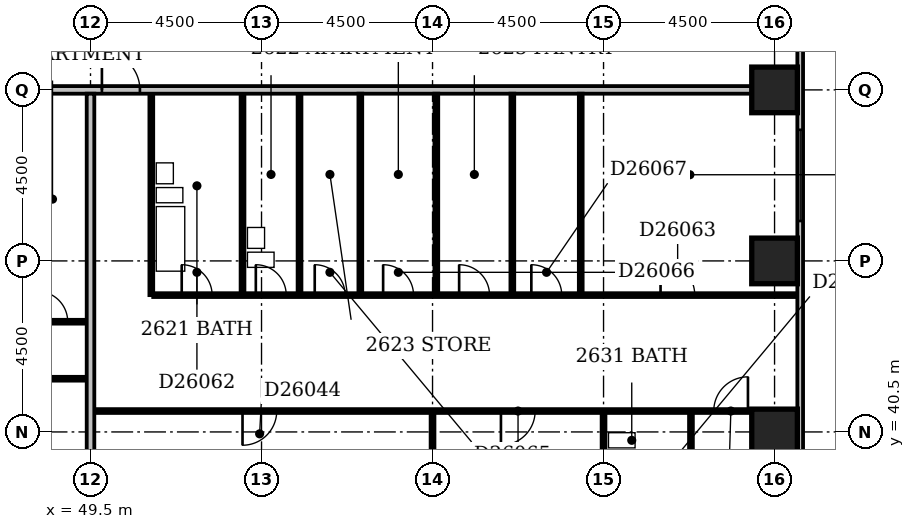
"""IFC4 building model, lengths in metres.
Left out: names, types, materials, properties, quantities, classifications, styles, units other than length and angle.
Written with IfcOpenShell. Run it as: python <this file> out.ifc"""

import sys

from ifc_helpers import new_model, si_unit, direction, frame, frame_2d, origin, origin_2d, place, context, subcontext, project, spatial, rectangle, extrude, element, fill, save


model = new_model("IFC4")
c1 = context("Model", 3, precision=1e-05, world=origin(), true_north=direction((0.0, 1.0)))
c2 = subcontext(c1, "Body", "Model", "MODEL_VIEW")
j1 = project(units=[si_unit("LENGTHUNIT", "METRE"), si_unit("PLANEANGLEUNIT", "RADIAN")], contexts=[c1])
p1 = place(None, origin())
s1 = spatial("IfcSite", under=j1, at=p1, CompositionType="ELEMENT")
p2 = place(p1, origin())
s2 = spatial("IfcBuilding", under=s1, at=p2, CompositionType="ELEMENT")
p3 = place(p2, frame((0.0, 0.0, 104.6)))
s3 = spatial("IfcBuildingStorey", under=s2, at=p3, CompositionType="ELEMENT", Elevation=104.6)
for number, where, z_axis, x_axis in (
    (1, (67.5, 40.5, -0.3), (0.0, 0.0, 1.0), (1.0, 0.0, 0.0)),
    (2, (67.5, 45.0, -0.3), (0.0, 0.0, 1.0), (1.0, 0.0, 0.0)),
    (3, (67.5, 49.5, -0.3), (0.0, 0.0, 1.0), (1.0, 0.0, 0.0)),
):
    element("IfcColumn", number, at=place(p3, frame(where, z_axis=z_axis, x_axis=x_axis)), inside=s3, PredefinedType="COLUMN", context=c2, shape_type="SweptSolid", body=[
        extrude(rectangle(XDim=1.2, YDim=1.2, at=origin_2d()), origin(), (0.0, 0.0, 1.0), 3.45),
    ])
p4 = place(p3, frame((68.175, 35.4, 0.0), z_axis=(0.0, 0.0, 1.0), x_axis=(0.0, 1.0, 0.0)))
e4 = element("IfcWall", 4, at=p4, inside=s3, PredefinedType="STANDARD", context=c2, shape_type="SweptSolid", body=[
    extrude(rectangle(XDim=23.85, YDim=0.15, at=frame_2d((11.925, 0.0))), origin(), (0.0, 0.0, 1.0), 2.5),
])
p5 = place(p4, frame((1.65, 0.0, 0.6)))
e5 = element("IfcOpeningElement", 5, at=p5, cuts=e4, PredefinedType="OPENING", context=c2, shape_type="SweptSolid", body=[
    extrude(rectangle(XDim=2.4, YDim=1.8, at=frame_2d((1.2, 0.9))), frame((0.0, 0.087, 0.0), z_axis=(0.0, -1.0, 0.0), x_axis=(1.0, 0.0, 0.0)), (0.0, 0.0, 1.0), 0.174),
])
p6 = place(p4, frame((10.65, 0.0, 0.6)))
e6 = element("IfcOpeningElement", 6, at=p6, cuts=e4, PredefinedType="OPENING", context=c2, shape_type="SweptSolid", body=[
    extrude(rectangle(XDim=2.4, YDim=1.8, at=frame_2d((1.2, 0.9))), frame((0.0, 0.087, 0.0), z_axis=(0.0, -1.0, 0.0), x_axis=(1.0, 0.0, 0.0)), (0.0, 0.0, 1.0), 0.174),
])
p7 = place(p4, frame((19.65, 0.0, 0.6)))
e7 = element("IfcOpeningElement", 7, at=p7, cuts=e4, PredefinedType="OPENING", context=c2, shape_type="SweptSolid", body=[
    extrude(rectangle(XDim=2.4, YDim=1.8, at=frame_2d((1.2, 0.9))), frame((0.0, 0.087, 0.0), z_axis=(0.0, -1.0, 0.0), x_axis=(1.0, 0.0, 0.0)), (0.0, 0.0, 1.0), 0.174),
])
p8 = place(p3, frame((49.5, 36.6, 0.0), z_axis=(0.0, 0.0, 1.0), x_axis=(0.0, 1.0, 0.0)))
e8 = element("IfcWall", 8, at=p8, inside=s3, PredefinedType="PARTITIONING", context=c2, shape_type="SweptSolid", body=[
    extrude(rectangle(XDim=12.8, YDim=0.2, at=frame_2d((6.4, 0.0))), origin(), (0.0, 0.0, 1.0), 3.15),
])
p9 = place(p3, frame((58.5, 36.6, 0.0), z_axis=(0.0, 0.0, 1.0), x_axis=(0.0, 1.0, 0.0)))
e9 = element("IfcWall", 9, at=p9, inside=s3, PredefinedType="PARTITIONING", context=c2, shape_type="SweptSolid", body=[
    extrude(rectangle(XDim=4.4, YDim=0.1, at=frame_2d((2.2, 0.0))), origin(), (0.0, 0.0, 1.0), 3.15),
])
p10 = place(p3, frame((63.0, 36.6, 0.0), z_axis=(0.0, 0.0, 1.0), x_axis=(0.0, 1.0, 0.0)))
e10 = element("IfcWall", 10, at=p10, inside=s3, PredefinedType="PARTITIONING", context=c2, shape_type="SweptSolid", body=[
    extrude(rectangle(XDim=4.4, YDim=0.1, at=frame_2d((2.2, 0.0))), origin(), (0.0, 0.0, 1.0), 2.25),
])
p11 = place(p3, frame((65.3, 38.15, 0.0), z_axis=(0.0, 0.0, 1.0), x_axis=(0.0, 1.0, 0.0)))
e11 = element("IfcWall", 11, at=p11, inside=s3, PredefinedType="PLUMBINGWALL", context=c2, shape_type="SweptSolid", body=[
    extrude(rectangle(XDim=2.85, YDim=0.1, at=frame_2d((1.425, 0.0))), origin(), (0.0, 0.0, 1.0), 3.15),
])
p12 = place(p11, frame((1.05, 0.0, 0.0)))
e12 = element("IfcOpeningElement", 12, at=p12, cuts=e11, PredefinedType="OPENING", context=c2, shape_type="SweptSolid", body=[
    extrude(rectangle(XDim=0.8, YDim=2.1, at=frame_2d((0.4, 1.05))), frame((0.0, 0.062, 0.0), z_axis=(0.0, -1.0, 0.0), x_axis=(1.0, 0.0, 0.0)), (0.0, 0.0, 1.0), 0.124),
])
p13 = place(p3, frame((49.6, 41.05, 0.0), z_axis=(0.0, 0.0, 1.0), x_axis=(1.0, 0.0, 0.0)))
e13 = element("IfcWall", 13, at=p13, inside=s3, PredefinedType="PARTITIONING", context=c2, shape_type="SweptSolid", body=[
    extrude(rectangle(XDim=17.3, YDim=0.1, at=frame_2d((8.65, 0.0))), origin(), (0.0, 0.0, 1.0), 3.15),
])
p14 = place(p13, frame((3.9, 0.0, 0.0)))
e14 = element("IfcOpeningElement", 14, at=p14, cuts=e13, PredefinedType="OPENING", context=c2, shape_type="SweptSolid", body=[
    extrude(rectangle(XDim=0.9, YDim=2.1, at=frame_2d((0.45, 1.05))), frame((0.0, 0.062, 0.0), z_axis=(0.0, -1.0, 0.0), x_axis=(1.0, 0.0, 0.0)), (0.0, 0.0, 1.0), 0.124),
])
p15 = place(p13, frame((10.7, 0.0, 0.0)))
e15 = element("IfcOpeningElement", 15, at=p15, cuts=e13, PredefinedType="OPENING", context=c2, shape_type="SweptSolid", body=[
    extrude(rectangle(XDim=0.9, YDim=2.1, at=frame_2d((0.45, 1.05))), frame((0.0, 0.062, 0.0), z_axis=(0.0, -1.0, 0.0), x_axis=(1.0, 0.0, 0.0)), (0.0, 0.0, 1.0), 0.124),
])
p16 = place(p13, frame((16.3, 0.0, 0.0)))
e16 = element("IfcOpeningElement", 16, at=p16, cuts=e13, PredefinedType="OPENING", context=c2, shape_type="SweptSolid", body=[
    extrude(rectangle(XDim=0.9, YDim=2.1, at=frame_2d((0.45, 1.05))), frame((0.0, 0.062, 0.0), z_axis=(0.0, -1.0, 0.0), x_axis=(1.0, 0.0, 0.0)), (0.0, 0.0, 1.0), 0.124),
])
p17 = place(p3, frame((36.1, 41.9, 0.0), z_axis=(0.0, 0.0, 1.0), x_axis=(1.0, 0.0, 0.0)))
e17 = element("IfcWall", 17, at=p17, inside=s3, PredefinedType="PARTITIONING", context=c2, shape_type="SweptSolid", body=[
    extrude(rectangle(XDim=13.3, YDim=0.1, at=frame_2d((6.65, 0.0))), origin(), (0.0, 0.0, 1.0), 3.15),
])
p18 = place(p17, frame((1.7, 0.0, 0.0)))
e18 = element("IfcOpeningElement", 18, at=p18, cuts=e17, PredefinedType="OPENING", context=c2, shape_type="SweptSolid", body=[
    extrude(rectangle(XDim=0.9, YDim=2.1, at=frame_2d((0.45, 1.05))), frame((0.0, 0.062, 0.0), z_axis=(0.0, -1.0, 0.0), x_axis=(1.0, 0.0, 0.0)), (0.0, 0.0, 1.0), 0.124),
])
p19 = place(p17, frame((7.35, 0.0, 0.0)))
e19 = element("IfcOpeningElement", 19, at=p19, cuts=e17, PredefinedType="OPENING", context=c2, shape_type="SweptSolid", body=[
    extrude(rectangle(XDim=0.9, YDim=2.1, at=frame_2d((0.45, 1.05))), frame((0.0, 0.062, 0.0), z_axis=(0.0, -1.0, 0.0), x_axis=(1.0, 0.0, 0.0)), (0.0, 0.0, 1.0), 0.124),
])
p20 = place(p17, frame((10.7, 0.0, 0.0)))
e20 = element("IfcOpeningElement", 20, at=p20, cuts=e17, PredefinedType="OPENING", context=c2, shape_type="SweptSolid", body=[
    extrude(rectangle(XDim=0.9, YDim=2.1, at=frame_2d((0.45, 1.05))), frame((0.0, 0.062, 0.0), z_axis=(0.0, -1.0, 0.0), x_axis=(1.0, 0.0, 0.0)), (0.0, 0.0, 1.0), 0.124),
])
p21 = place(p3, frame((37.65, 43.4, 0.0), z_axis=(0.0, 0.0, 1.0), x_axis=(1.0, 0.0, 0.0)))
e21 = element("IfcWall", 21, at=p21, inside=s3, PredefinedType="PARTITIONING", context=c2, shape_type="SweptSolid", body=[
    extrude(rectangle(XDim=11.75, YDim=0.1, at=frame_2d((5.875, 0.0))), origin(), (0.0, 0.0, 1.0), 3.15),
])
p22 = place(p21, frame((6.65, 0.0, 0.0)))
e22 = element("IfcOpeningElement", 22, at=p22, cuts=e21, PredefinedType="OPENING", context=c2, shape_type="SweptSolid", body=[
    extrude(rectangle(XDim=0.8, YDim=2.1, at=frame_2d((0.4, 1.05))), frame((0.0, 0.062, 0.0), z_axis=(0.0, -1.0, 0.0), x_axis=(1.0, 0.0, 0.0)), (0.0, 0.0, 1.0), 0.124),
])
p23 = place(p21, frame((2.45, 0.0, 0.0)))
e23 = element("IfcOpeningElement", 23, at=p23, cuts=e21, PredefinedType="OPENING", context=c2, shape_type="SweptSolid", body=[
    extrude(rectangle(XDim=0.9, YDim=2.1, at=frame_2d((0.45, 1.05))), frame((0.0, 0.062, 0.0), z_axis=(0.0, -1.0, 0.0), x_axis=(1.0, 0.0, 0.0)), (0.0, 0.0, 1.0), 0.124),
])
p24 = place(p21, frame((8.65, 0.0, 0.0)))
e24 = element("IfcOpeningElement", 24, at=p24, cuts=e21, PredefinedType="OPENING", context=c2, shape_type="SweptSolid", body=[
    extrude(rectangle(XDim=0.8, YDim=2.1, at=frame_2d((0.4, 1.05))), frame((0.0, 0.062, 0.0), z_axis=(0.0, -1.0, 0.0), x_axis=(1.0, 0.0, 0.0)), (0.0, 0.0, 1.0), 0.124),
])
p25 = place(p21, frame((10.45, 0.0, 0.0)))
e25 = element("IfcOpeningElement", 25, at=p25, cuts=e21, PredefinedType="OPENING", context=c2, shape_type="SweptSolid", body=[
    extrude(rectangle(XDim=0.8, YDim=2.1, at=frame_2d((0.4, 1.05))), frame((0.0, 0.062, 0.0), z_axis=(0.0, -1.0, 0.0), x_axis=(1.0, 0.0, 0.0)), (0.0, 0.0, 1.0), 0.124),
])
p26 = place(p3, frame((51.1, 44.1, 0.0), z_axis=(0.0, 0.0, 1.0), x_axis=(0.0, 1.0, 0.0)))
e26 = element("IfcWall", 26, at=p26, inside=s3, PredefinedType="PLUMBINGWALL", context=c2, shape_type="SweptSolid", body=[
    extrude(rectangle(XDim=5.3, YDim=0.1, at=frame_2d((2.65, 0.0))), origin(), (0.0, 0.0, 1.0), 3.15),
])
p27 = place(p3, frame((51.15, 44.1, 0.0), z_axis=(0.0, 0.0, 1.0), x_axis=(1.0, 0.0, 0.0)))
e27 = element("IfcWall", 27, at=p27, inside=s3, PredefinedType="PARTITIONING", context=c2, shape_type="SweptSolid", body=[
    extrude(rectangle(XDim=16.95, YDim=0.1, at=frame_2d((8.475, 0.0))), origin(), (0.0, 0.0, 1.0), 3.15),
])
p28 = place(p27, frame((0.75, 0.0, 0.0)))
e28 = element("IfcOpeningElement", 28, at=p28, cuts=e27, PredefinedType="OPENING", context=c2, shape_type="SweptSolid", body=[
    extrude(rectangle(XDim=0.8, YDim=2.1, at=frame_2d((0.4, 1.05))), frame((0.0, 0.062, 0.0), z_axis=(0.0, -1.0, 0.0), x_axis=(1.0, 0.0, 0.0)), (0.0, 0.0, 1.0), 0.124),
])
p29 = place(p27, frame((13.35, 0.0, 0.0)))
e29 = element("IfcOpeningElement", 29, at=p29, cuts=e27, PredefinedType="OPENING", context=c2, shape_type="SweptSolid", body=[
    extrude(rectangle(XDim=0.9, YDim=2.1, at=frame_2d((0.45, 1.05))), frame((0.0, 0.062, 0.0), z_axis=(0.0, -1.0, 0.0), x_axis=(1.0, 0.0, 0.0)), (0.0, 0.0, 1.0), 0.124),
])
p30 = place(p27, frame((8.05, 0.0, 0.0)))
e30 = element("IfcOpeningElement", 30, at=p30, cuts=e27, PredefinedType="OPENING", context=c2, shape_type="SweptSolid", body=[
    extrude(rectangle(XDim=0.8, YDim=2.1, at=frame_2d((0.4, 1.05))), frame((0.0, 0.062, 0.0), z_axis=(0.0, -1.0, 0.0), x_axis=(1.0, 0.0, 0.0)), (0.0, 0.0, 1.0), 0.124),
])
p31 = place(p27, frame((4.25, 0.0, 0.0)))
e31 = element("IfcOpeningElement", 31, at=p31, cuts=e27, PredefinedType="OPENING", context=c2, shape_type="SweptSolid", body=[
    extrude(rectangle(XDim=0.8, YDim=2.1, at=frame_2d((0.4, 1.05))), frame((0.0, 0.062, 0.0), z_axis=(0.0, -1.0, 0.0), x_axis=(1.0, 0.0, 0.0)), (0.0, 0.0, 1.0), 0.124),
])
p32 = place(p27, frame((6.05, 0.0, 0.0)))
e32 = element("IfcOpeningElement", 32, at=p32, cuts=e27, PredefinedType="OPENING", context=c2, shape_type="SweptSolid", body=[
    extrude(rectangle(XDim=0.8, YDim=2.1, at=frame_2d((0.4, 1.05))), frame((0.0, 0.062, 0.0), z_axis=(0.0, -1.0, 0.0), x_axis=(1.0, 0.0, 0.0)), (0.0, 0.0, 1.0), 0.124),
])
p33 = place(p27, frame((9.95, 0.0, 0.0)))
e33 = element("IfcOpeningElement", 33, at=p33, cuts=e27, PredefinedType="OPENING", context=c2, shape_type="SweptSolid", body=[
    extrude(rectangle(XDim=0.8, YDim=2.1, at=frame_2d((0.4, 1.05))), frame((0.0, 0.062, 0.0), z_axis=(0.0, -1.0, 0.0), x_axis=(1.0, 0.0, 0.0)), (0.0, 0.0, 1.0), 0.124),
])
p34 = place(p27, frame((2.7, 0.0, 0.0)))
e34 = element("IfcOpeningElement", 34, at=p34, cuts=e27, PredefinedType="OPENING", context=c2, shape_type="SweptSolid", body=[
    extrude(rectangle(XDim=0.8, YDim=2.1, at=frame_2d((0.4, 1.05))), frame((0.0, 0.062, 0.0), z_axis=(0.0, -1.0, 0.0), x_axis=(1.0, 0.0, 0.0)), (0.0, 0.0, 1.0), 0.124),
])
p35 = place(p3, frame((53.5, 44.15, 0.0), z_axis=(0.0, 0.0, 1.0), x_axis=(0.0, 1.0, 0.0)))
e35 = element("IfcWall", 35, at=p35, inside=s3, PredefinedType="PLUMBINGWALL", context=c2, shape_type="SweptSolid", body=[
    extrude(rectangle(XDim=5.25, YDim=0.1, at=frame_2d((2.625, 0.0))), origin(), (0.0, 0.0, 1.0), 2.45),
])
p36 = place(p3, frame((55.0, 44.15, 0.0), z_axis=(0.0, 0.0, 1.0), x_axis=(0.0, 1.0, 0.0)))
e36 = element("IfcWall", 36, at=p36, inside=s3, PredefinedType="PLUMBINGWALL", context=c2, shape_type="SweptSolid", body=[
    extrude(rectangle(XDim=5.25, YDim=0.1, at=frame_2d((2.625, 0.0))), origin(), (0.0, 0.0, 1.0), 3.15),
])
for number, where, z_axis, x_axis in (
    (37, (56.6, 44.15, 0.0), (0.0, 0.0, 1.0), (0.0, 1.0, 0.0)),
    (38, (58.6, 44.15, 0.0), (0.0, 0.0, 1.0), (0.0, 1.0, 0.0)),
    (39, (60.6, 44.15, 0.0), (0.0, 0.0, 1.0), (0.0, 1.0, 0.0)),
):
    element("IfcWall", number, at=place(p3, frame(where, z_axis=z_axis, x_axis=x_axis)), inside=s3, PredefinedType="PARTITIONING", context=c2, shape_type="SweptSolid", body=[
        extrude(rectangle(XDim=5.25, YDim=0.1, at=frame_2d((2.625, 0.0))), origin(), (0.0, 0.0, 1.0), 3.15),
    ])
p37 = place(p3, frame((62.4, 44.15, 0.0), z_axis=(0.0, 0.0, 1.0), x_axis=(0.0, 1.0, 0.0)))
e40 = element("IfcWall", 40, at=p37, inside=s3, PredefinedType="PARTITIONING", context=c2, shape_type="SweptSolid", body=[
    extrude(rectangle(XDim=5.25, YDim=0.1, at=frame_2d((2.625, 0.0))), origin(), (0.0, 0.0, 1.0), 2.25),
])
p38 = place(p3, frame((9.1, 49.5, 0.0), z_axis=(0.0, 0.0, 1.0), x_axis=(1.0, 0.0, 0.0)))
e41 = element("IfcWall", 41, at=p38, inside=s3, PredefinedType="PARTITIONING", context=c2, shape_type="SweptSolid", body=[
    extrude(rectangle(XDim=57.8, YDim=0.2, at=frame_2d((28.9, 0.0))), origin(), (0.0, 0.0, 1.0), 3.15),
])
p39 = place(p38, frame((14.95, 0.0, 0.0)))
e42 = element("IfcOpeningElement", 42, at=p39, cuts=e41, PredefinedType="OPENING", context=c2, shape_type="SweptSolid", body=[
    extrude(rectangle(XDim=1.0, YDim=2.1, at=frame_2d((0.5, 1.05))), frame((0.0, 0.112, 0.0), z_axis=(0.0, -1.0, 0.0), x_axis=(1.0, 0.0, 0.0)), (0.0, 0.0, 1.0), 0.224),
])
p40 = place(p38, frame((20.6, 0.0, 0.0)))
e43 = element("IfcOpeningElement", 43, at=p40, cuts=e41, PredefinedType="OPENING", context=c2, shape_type="SweptSolid", body=[
    extrude(rectangle(XDim=1.0, YDim=2.1, at=frame_2d((0.5, 1.05))), frame((0.0, 0.112, 0.0), z_axis=(0.0, -1.0, 0.0), x_axis=(1.0, 0.0, 0.0)), (0.0, 0.0, 1.0), 0.224),
])
p41 = place(p38, frame((27.2, 0.0, 0.0)))
e44 = element("IfcOpeningElement", 44, at=p41, cuts=e41, PredefinedType="OPENING", context=c2, shape_type="SweptSolid", body=[
    extrude(rectangle(XDim=1.0, YDim=2.1, at=frame_2d((0.5, 1.05))), frame((0.0, 0.112, 0.0), z_axis=(0.0, -1.0, 0.0), x_axis=(1.0, 0.0, 0.0)), (0.0, 0.0, 1.0), 0.224),
])
p42 = place(p38, frame((40.7, 0.0, 0.0)))
e45 = element("IfcOpeningElement", 45, at=p42, cuts=e41, PredefinedType="OPENING", context=c2, shape_type="SweptSolid", body=[
    extrude(rectangle(XDim=1.0, YDim=2.1, at=frame_2d((0.5, 1.05))), frame((0.0, 0.112, 0.0), z_axis=(0.0, -1.0, 0.0), x_axis=(1.0, 0.0, 0.0)), (0.0, 0.0, 1.0), 0.224),
])
p43 = place(p38, frame((10.65, 0.0, 0.0)))
e46 = element("IfcOpeningElement", 46, at=p43, cuts=e41, PredefinedType="OPENING", context=c2, shape_type="SweptSolid", body=[
    extrude(rectangle(XDim=0.9, YDim=2.1, at=frame_2d((0.45, 1.05))), frame((0.0, 0.112, 0.0), z_axis=(0.0, -1.0, 0.0), x_axis=(1.0, 0.0, 0.0)), (0.0, 0.0, 1.0), 0.224),
])
p44 = place(p6, origin())
e47 = element("IfcWindow", 47, at=p44, inside=s3, PartitioningType="SINGLE_PANEL", PredefinedType="WINDOW", context=c2, shape_type="SweptSolid", body=[
    extrude(rectangle(XDim=2.4, YDim=1.8, at=frame_2d((1.2, 0.9))), frame((0.0, 0.03, 0.0), z_axis=(0.0, -1.0, 0.0), x_axis=(1.0, 0.0, 0.0)), (0.0, 0.0, 1.0), 0.06),
])
fill(e6, e47)
p45 = place(p14, frame((0.9, 0.0, 0.0), z_axis=(0.0, 0.0, 1.0), x_axis=(-1.0, 0.0, 0.0)))
e48 = element("IfcDoor", 48, at=p45, inside=s3, OperationType="SINGLE_SWING_RIGHT", PredefinedType="DOOR", context=c2, shape_type="SweptSolid", body=[
    extrude(rectangle(XDim=0.9, YDim=2.1, at=frame_2d((0.45, 1.05))), frame((0.0, 0.025, 0.0), z_axis=(0.0, -1.0, 0.0), x_axis=(1.0, 0.0, 0.0)), (0.0, 0.0, 1.0), 0.05),
])
fill(e14, e48)
p46 = place(p15, frame((0.9, 0.0, 0.0), z_axis=(0.0, 0.0, 1.0), x_axis=(-1.0, 0.0, 0.0)))
e49 = element("IfcDoor", 49, at=p46, inside=s3, OperationType="SINGLE_SWING_RIGHT", PredefinedType="DOOR", context=c2, shape_type="SweptSolid", body=[
    extrude(rectangle(XDim=0.9, YDim=2.1, at=frame_2d((0.45, 1.05))), frame((0.0, 0.025, 0.0), z_axis=(0.0, -1.0, 0.0), x_axis=(1.0, 0.0, 0.0)), (0.0, 0.0, 1.0), 0.05),
])
fill(e15, e49)
p47 = place(p16, frame((0.9, 0.0, 0.0), z_axis=(0.0, 0.0, 1.0), x_axis=(-1.0, 0.0, 0.0)))
e50 = element("IfcDoor", 50, at=p47, inside=s3, OperationType="SINGLE_SWING_LEFT", PredefinedType="DOOR", context=c2, shape_type="SweptSolid", body=[
    extrude(rectangle(XDim=0.9, YDim=2.1, at=frame_2d((0.45, 1.05))), frame((0.0, 0.025, 0.0), z_axis=(0.0, -1.0, 0.0), x_axis=(1.0, 0.0, 0.0)), (0.0, 0.0, 1.0), 0.05),
])
fill(e16, e50)
p48 = place(p25, origin())
e51 = element("IfcDoor", 51, at=p48, inside=s3, OperationType="SINGLE_SWING_LEFT", PredefinedType="DOOR", context=c2, shape_type="SweptSolid", body=[
    extrude(rectangle(XDim=0.8, YDim=2.1, at=frame_2d((0.4, 1.05))), frame((0.0, 0.025, 0.0), z_axis=(0.0, -1.0, 0.0), x_axis=(1.0, 0.0, 0.0)), (0.0, 0.0, 1.0), 0.05),
])
fill(e25, e51)
p49 = place(p28, origin())
e52 = element("IfcDoor", 52, at=p49, inside=s3, OperationType="SINGLE_SWING_LEFT", PredefinedType="DOOR", context=c2, shape_type="SweptSolid", body=[
    extrude(rectangle(XDim=0.8, YDim=2.1, at=frame_2d((0.4, 1.05))), frame((0.0, 0.025, 0.0), z_axis=(0.0, -1.0, 0.0), x_axis=(1.0, 0.0, 0.0)), (0.0, 0.0, 1.0), 0.05),
])
fill(e28, e52)
p50 = place(p29, origin())
e53 = element("IfcDoor", 53, at=p50, inside=s3, OperationType="SINGLE_SWING_LEFT", PredefinedType="DOOR", context=c2, shape_type="SweptSolid", body=[
    extrude(rectangle(XDim=0.9, YDim=2.1, at=frame_2d((0.45, 1.05))), frame((0.0, 0.025, 0.0), z_axis=(0.0, -1.0, 0.0), x_axis=(1.0, 0.0, 0.0)), (0.0, 0.0, 1.0), 0.05),
])
fill(e29, e53)
p51 = place(p30, origin())
e54 = element("IfcDoor", 54, at=p51, inside=s3, OperationType="SINGLE_SWING_LEFT", PredefinedType="DOOR", context=c2, shape_type="SweptSolid", body=[
    extrude(rectangle(XDim=0.8, YDim=2.1, at=frame_2d((0.4, 1.05))), frame((0.0, 0.025, 0.0), z_axis=(0.0, -1.0, 0.0), x_axis=(1.0, 0.0, 0.0)), (0.0, 0.0, 1.0), 0.05),
])
fill(e30, e54)
p52 = place(p31, origin())
e55 = element("IfcDoor", 55, at=p52, inside=s3, OperationType="SINGLE_SWING_LEFT", PredefinedType="DOOR", context=c2, shape_type="SweptSolid", body=[
    extrude(rectangle(XDim=0.8, YDim=2.1, at=frame_2d((0.4, 1.05))), frame((0.0, 0.025, 0.0), z_axis=(0.0, -1.0, 0.0), x_axis=(1.0, 0.0, 0.0)), (0.0, 0.0, 1.0), 0.05),
])
fill(e31, e55)
p53 = place(p32, origin())
e56 = element("IfcDoor", 56, at=p53, inside=s3, OperationType="SINGLE_SWING_LEFT", PredefinedType="DOOR", context=c2, shape_type="SweptSolid", body=[
    extrude(rectangle(XDim=0.8, YDim=2.1, at=frame_2d((0.4, 1.05))), frame((0.0, 0.025, 0.0), z_axis=(0.0, -1.0, 0.0), x_axis=(1.0, 0.0, 0.0)), (0.0, 0.0, 1.0), 0.05),
])
fill(e32, e56)
p54 = place(p33, origin())
e57 = element("IfcDoor", 57, at=p54, inside=s3, OperationType="SINGLE_SWING_LEFT", PredefinedType="DOOR", context=c2, shape_type="SweptSolid", body=[
    extrude(rectangle(XDim=0.8, YDim=2.1, at=frame_2d((0.4, 1.05))), frame((0.0, 0.025, 0.0), z_axis=(0.0, -1.0, 0.0), x_axis=(1.0, 0.0, 0.0)), (0.0, 0.0, 1.0), 0.05),
])
fill(e33, e57)
p55 = place(p34, origin())
e58 = element("IfcDoor", 58, at=p55, inside=s3, OperationType="SINGLE_SWING_LEFT", PredefinedType="DOOR", context=c2, shape_type="SweptSolid", body=[
    extrude(rectangle(XDim=0.8, YDim=2.1, at=frame_2d((0.4, 1.05))), frame((0.0, 0.025, 0.0), z_axis=(0.0, -1.0, 0.0), x_axis=(1.0, 0.0, 0.0)), (0.0, 0.0, 1.0), 0.05),
])
fill(e34, e58)
p56 = place(p42, origin())
e59 = element("IfcDoor", 59, at=p56, inside=s3, OperationType="SINGLE_SWING_LEFT", PredefinedType="DOOR", context=c2, shape_type="SweptSolid", body=[
    extrude(rectangle(XDim=1.0, YDim=2.1, at=frame_2d((0.5, 1.05))), frame((0.0, 0.025, 0.0), z_axis=(0.0, -1.0, 0.0), x_axis=(1.0, 0.0, 0.0)), (0.0, 0.0, 1.0), 0.05),
])
fill(e45, e59)
save(model, sys.argv[1])
